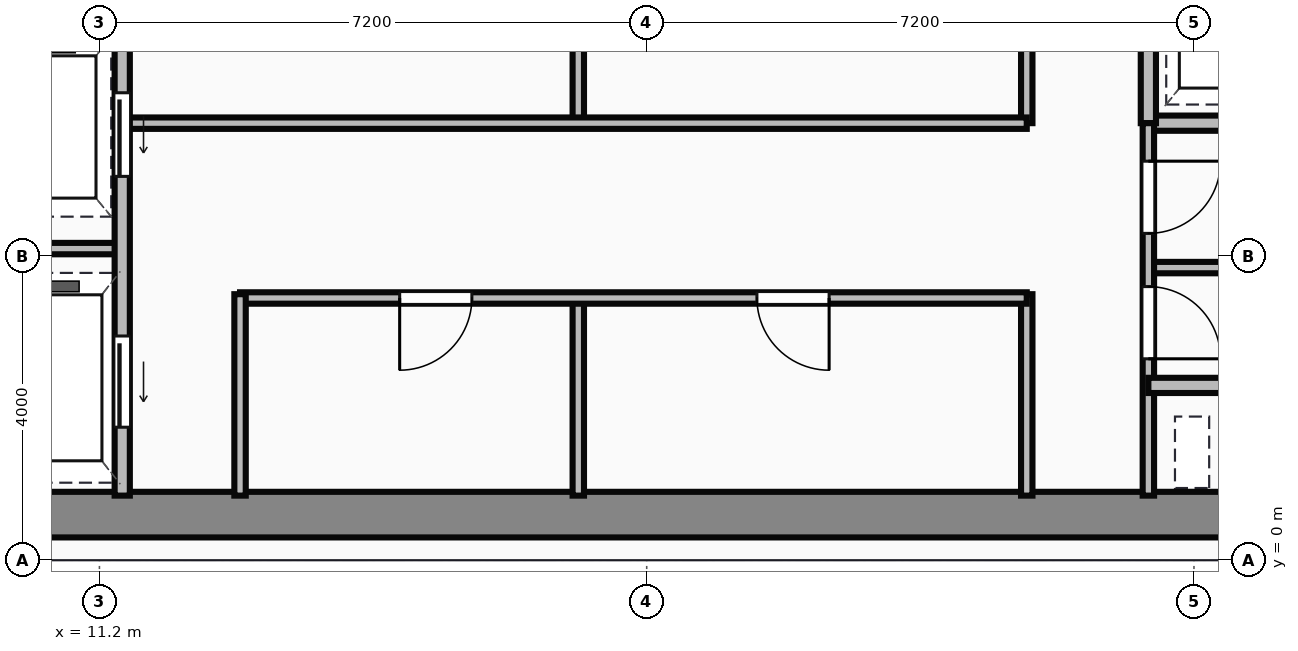
"""IFC4 building model, lengths in metres.
Left out: names, types, materials, properties, quantities, classifications, styles, units other than length and angle.
Written with IfcOpenShell. Run it as: python <this file> out.ifc"""

import sys

from ifc_helpers import new_model, si_unit, direction, frame, frame_2d, origin, place, context, subcontext, project, spatial, rectangle, extrude, source, transform, mapped, element, fill, save


model = new_model("IFC4")
c1 = context("Model", 3, precision=1e-05, world=origin(), true_north=direction((0.0, 1.0)))
c2 = subcontext(c1, "Body", "Model", "MODEL_VIEW")
j1 = project(units=[si_unit("LENGTHUNIT", "METRE"), si_unit("PLANEANGLEUNIT", "RADIAN")], contexts=[c1])
p1 = place(None, origin())
s1 = spatial("IfcSite", under=j1, at=p1, CompositionType="ELEMENT")
p2 = place(p1, origin())
s2 = spatial("IfcBuilding", under=s1, at=p2, CompositionType="ELEMENT")
p3 = place(p2, frame((0.0, 0.0, 217.8)))
s3 = spatial("IfcBuildingStorey", under=s2, at=p3, CompositionType="ELEMENT", Elevation=217.8)
m1 = source(origin(), c2, "Body", "SweptSolid", [
    extrude(rectangle(XDim=29.5, YDim=0.6, at=frame_2d((14.75, 0.0))), origin(), (0.0, 0.0, 1.0), 3.65),
])
p4 = place(p3, frame((4.5, 0.6, 0.0), z_axis=(0.0, 0.0, 1.0), x_axis=(1.0, 0.0, 0.0)))
e1 = element("IfcWall", 1, at=p4, inside=s3, PredefinedType="SHEAR", context=c2, shape_type="MappedRepresentation", body=[
    mapped(m1, transform((0.0, 0.0, 0.0))),
])
m2 = source(origin(), c2, "Body", "SweptSolid", [
    extrude(rectangle(XDim=9.6, YDim=0.2, at=frame_2d((4.8, 0.0))), origin(), (0.0, 0.0, 1.0), 3.4),
])
p5 = place(p3, frame((11.5, 0.85, 0.0), z_axis=(0.0, 0.0, 1.0), x_axis=(0.0, 1.0, 0.0)))
e2 = element("IfcWall", 2, at=p5, inside=s3, PredefinedType="PARTITIONING", context=c2, shape_type="MappedRepresentation", body=[
    mapped(m2, transform((0.0, 0.0, 0.0))),
])
p6 = place(p5, frame((4.2, 0.0, 0.0)))
e3 = element("IfcOpeningElement", 3, at=p6, cuts=e2, PredefinedType="OPENING", context=c2, shape_type="SweptSolid", body=[
    extrude(rectangle(XDim=1.1, YDim=2.15, at=frame_2d((0.55, 1.075))), frame((0.0, 0.11, 0.0), z_axis=(0.0, -1.0, 0.0), x_axis=(1.0, 0.0, 0.0)), (0.0, 0.0, 1.0), 0.22),
])
p7 = place(p5, frame((0.9, 0.0, 0.0)))
e4 = element("IfcOpeningElement", 4, at=p7, cuts=e2, PredefinedType="OPENING", context=c2, shape_type="SweptSolid", body=[
    extrude(rectangle(XDim=1.2, YDim=2.15, at=frame_2d((0.6, 1.075))), frame((0.0, 0.11, 0.0), z_axis=(0.0, -1.0, 0.0), x_axis=(1.0, 0.0, 0.0)), (0.0, 0.0, 1.0), 0.22),
])
m3 = source(origin(), c2, "Body", "SweptSolid", [
    extrude(rectangle(XDim=2.4, YDim=0.15, at=frame_2d((1.2, 0.0))), origin(), (0.0, 0.0, 1.0), 3.4),
])
p8 = place(p3, frame((9.1, 4.1, 0.0), z_axis=(0.0, 0.0, 1.0), x_axis=(1.0, 0.0, 0.0)))
e5 = element("IfcWall", 5, at=p8, inside=s3, PredefinedType="PARTITIONING", context=c2, shape_type="MappedRepresentation", body=[
    mapped(m3, transform((0.0, 0.0, 0.0))),
])
m4 = source(origin(), c2, "Body", "SweptSolid", [
    extrude(rectangle(XDim=2.65, YDim=0.15, at=frame_2d((1.325, 0.0))), origin(), (0.0, 0.0, 1.0), 3.4),
])
p9 = place(p3, frame((13.05, 0.85, 0.0), z_axis=(0.0, 0.0, 1.0), x_axis=(0.0, 1.0, 0.0)))
e6 = element("IfcWall", 6, at=p9, inside=s3, PredefinedType="PARTITIONING", context=c2, shape_type="MappedRepresentation", body=[
    mapped(m4, transform((0.0, 0.0, 0.0))),
])
m5 = source(origin(), c2, "Body", "SweptSolid", [
    extrude(rectangle(XDim=10.35, YDim=0.15, at=frame_2d((5.175, 0.0))), origin(), (0.0, 0.0, 1.0), 3.4),
])
p10 = place(p3, frame((13.05, 3.45, 0.0), z_axis=(0.0, 0.0, 1.0), x_axis=(1.0, 0.0, 0.0)))
e7 = element("IfcWall", 7, at=p10, inside=s3, PredefinedType="PARTITIONING", context=c2, shape_type="MappedRepresentation", body=[
    mapped(m5, transform((0.0, 0.0, 0.0))),
])
p11 = place(p10, frame((2.1, 0.0, 0.0)))
e8 = element("IfcOpeningElement", 8, at=p11, cuts=e7, PredefinedType="OPENING", context=c2, shape_type="SweptSolid", body=[
    extrude(rectangle(XDim=0.95, YDim=2.15, at=frame_2d((0.475, 1.075))), frame((0.0, 0.085, 0.0), z_axis=(0.0, -1.0, 0.0), x_axis=(1.0, 0.0, 0.0)), (0.0, 0.0, 1.0), 0.17),
])
p12 = place(p10, frame((6.8, 0.0, 0.0)))
e9 = element("IfcOpeningElement", 9, at=p12, cuts=e7, PredefinedType="OPENING", context=c2, shape_type="SweptSolid", body=[
    extrude(rectangle(XDim=0.95, YDim=2.15, at=frame_2d((0.475, 1.075))), frame((0.0, 0.085, 0.0), z_axis=(0.0, -1.0, 0.0), x_axis=(1.0, 0.0, 0.0)), (0.0, 0.0, 1.0), 0.17),
])
p13 = place(p3, frame((23.4, 0.85, 0.0), z_axis=(0.0, 0.0, 1.0), x_axis=(0.0, 1.0, 0.0)))
e10 = element("IfcWall", 10, at=p13, inside=s3, PredefinedType="PARTITIONING", context=c2, shape_type="MappedRepresentation", body=[
    mapped(m4, transform((0.0, 0.0, 0.0))),
])
m6 = source(origin(), c2, "Body", "SweptSolid", [
    extrude(rectangle(XDim=2.6, YDim=0.15, at=frame_2d((1.3, 0.0))), origin(), (0.0, 0.0, 1.0), 3.4),
])
p14 = place(p3, frame((17.5, 0.85, 0.0), z_axis=(0.0, 0.0, 1.0), x_axis=(0.0, 1.0, 0.0)))
e11 = element("IfcWall", 11, at=p14, inside=s3, PredefinedType="PARTITIONING", context=c2, shape_type="MappedRepresentation", body=[
    mapped(m6, transform((0.0, 0.0, 0.0))),
])
m7 = source(origin(), c2, "Body", "SweptSolid", [
    extrude(rectangle(XDim=11.85, YDim=0.15, at=frame_2d((5.925, 0.0))), origin(), (0.0, 0.0, 1.0), 3.4),
])
p15 = place(p3, frame((11.55, 5.75, 0.0), z_axis=(0.0, 0.0, 1.0), x_axis=(1.0, 0.0, 0.0)))
e12 = element("IfcWall", 12, at=p15, inside=s3, PredefinedType="PARTITIONING", context=c2, shape_type="MappedRepresentation", body=[
    mapped(m7, transform((0.0, 0.0, 0.0))),
])
m8 = source(origin(), c2, "Body", "SweptSolid", [
    extrude(rectangle(XDim=2.6, YDim=0.15, at=frame_2d((1.3, 0.0))), origin(), (0.0, 0.0, 1.0), 3.4),
])
p16 = place(p3, frame((23.4, 5.75, 0.0), z_axis=(0.0, 0.0, 1.0), x_axis=(0.0, 1.0, 0.0)))
e13 = element("IfcWall", 13, at=p16, inside=s3, PredefinedType="PARTITIONING", context=c2, shape_type="MappedRepresentation", body=[
    mapped(m8, transform((0.0, 0.0, 0.0))),
])
m9 = source(origin(), c2, "Body", "SweptSolid", [
    extrude(rectangle(XDim=2.5, YDim=0.15, at=frame_2d((1.25, 0.0))), origin(), (0.0, 0.0, 1.0), 3.4),
])
p17 = place(p3, frame((17.5, 5.8, 0.0), z_axis=(0.0, 0.0, 1.0), x_axis=(0.0, 1.0, 0.0)))
e14 = element("IfcWall", 14, at=p17, inside=s3, PredefinedType="PARTITIONING", context=c2, shape_type="MappedRepresentation", body=[
    mapped(m9, transform((0.0, 0.0, 0.0))),
])
m10 = source(origin(), c2, "Body", "SweptSolid", [
    extrude(rectangle(XDim=4.55, YDim=0.2, at=frame_2d((2.275, 0.0))), origin(), (0.0, 0.0, 1.0), 3.4),
])
p18 = place(p3, frame((25.0, 5.75, 0.0), z_axis=(0.0, 0.0, 1.0), x_axis=(1.0, 0.0, 0.0)))
e15 = element("IfcWall", 15, at=p18, inside=s3, PredefinedType="PARTITIONING", context=c2, shape_type="MappedRepresentation", body=[
    mapped(m10, transform((0.0, 0.0, 0.0))),
])
m11 = source(origin(), c2, "Body", "SweptSolid", [
    extrude(rectangle(XDim=2.6, YDim=0.2, at=frame_2d((1.3, 0.0))), origin(), (0.0, 0.0, 1.0), 3.4),
])
p19 = place(p3, frame((25.0, 5.75, 0.0), z_axis=(0.0, 0.0, 1.0), x_axis=(0.0, 1.0, 0.0)))
e16 = element("IfcWall", 16, at=p19, inside=s3, PredefinedType="PARTITIONING", context=c2, shape_type="MappedRepresentation", body=[
    mapped(m11, transform((0.0, 0.0, 0.0))),
])
m12 = source(origin(), c2, "Body", "SweptSolid", [
    extrude(rectangle(XDim=4.9, YDim=0.15, at=frame_2d((2.45, 0.0))), origin(), (0.0, 0.0, 1.0), 3.4),
])
p20 = place(p3, frame((25.0, 0.85, 0.0), z_axis=(0.0, 0.0, 1.0), x_axis=(0.0, 1.0, 0.0)))
e17 = element("IfcWall", 17, at=p20, inside=s3, PredefinedType="PARTITIONING", context=c2, shape_type="MappedRepresentation", body=[
    mapped(m12, transform((0.0, 0.0, 0.0))),
])
p21 = place(p20, frame((1.8, 0.0, 0.0)))
e18 = element("IfcOpeningElement", 18, at=p21, cuts=e17, PredefinedType="OPENING", context=c2, shape_type="SweptSolid", body=[
    extrude(rectangle(XDim=0.95, YDim=2.15, at=frame_2d((0.475, 1.075))), frame((0.0, 0.085, 0.0), z_axis=(0.0, -1.0, 0.0), x_axis=(1.0, 0.0, 0.0)), (0.0, 0.0, 1.0), 0.17),
])
p22 = place(p20, frame((3.45, 0.0, 0.0)))
e19 = element("IfcOpeningElement", 19, at=p22, cuts=e17, PredefinedType="OPENING", context=c2, shape_type="SweptSolid", body=[
    extrude(rectangle(XDim=0.95, YDim=2.15, at=frame_2d((0.475, 1.075))), frame((0.0, 0.085, 0.0), z_axis=(0.0, -1.0, 0.0), x_axis=(1.0, 0.0, 0.0)), (0.0, 0.0, 1.0), 0.17),
])
m13 = source(origin(), c2, "Body", "SweptSolid", [
    extrude(rectangle(XDim=2.4, YDim=0.2, at=frame_2d((1.2, 0.0))), origin(), (0.0, 0.0, 1.0), 3.4),
])
p23 = place(p3, frame((25.0, 2.3, 0.0), z_axis=(0.0, 0.0, 1.0), x_axis=(1.0, 0.0, 0.0)))
e20 = element("IfcWall", 20, at=p23, inside=s3, PredefinedType="PARTITIONING", context=c2, shape_type="MappedRepresentation", body=[
    mapped(m13, transform((0.0, 0.0, 0.0))),
])
m14 = source(origin(), c2, "Body", "SweptSolid", [
    extrude(rectangle(XDim=4.55, YDim=0.15, at=frame_2d((2.275, 0.0))), origin(), (0.0, 0.0, 1.0), 3.4),
])
p24 = place(p3, frame((25.0, 3.85, 0.0), z_axis=(0.0, 0.0, 1.0), x_axis=(1.0, 0.0, 0.0)))
e21 = element("IfcWall", 21, at=p24, inside=s3, PredefinedType="PARTITIONING", context=c2, shape_type="MappedRepresentation", body=[
    mapped(m14, transform((0.0, 0.0, 0.0))),
])
m15 = source(origin(), c2, "Body", "SweptSolid", [
    extrude(rectangle(XDim=1.1, YDim=2.15, at=frame_2d((0.55, 1.075))), frame((0.0, 0.025, 0.0), z_axis=(0.0, -1.0, 0.0), x_axis=(1.0, 0.0, 0.0)), (0.0, 0.0, 1.0), 0.05),
])
p25 = place(p6, frame((1.1, 0.0, 0.0), z_axis=(0.0, 0.0, 1.0), x_axis=(-1.0, 0.0, 0.0)))
e22 = element("IfcDoor", 22, at=p25, inside=s3, OperationType="SLIDING_TO_LEFT", PredefinedType="DOOR", context=c2, shape_type="MappedRepresentation", body=[
    mapped(m15, transform((0.0, 0.0, 0.0))),
])
fill(e3, e22)
m16 = source(origin(), c2, "Body", "SweptSolid", [
    extrude(rectangle(XDim=1.2, YDim=2.15, at=frame_2d((0.6, 1.075))), frame((0.0, 0.025, 0.0), z_axis=(0.0, -1.0, 0.0), x_axis=(1.0, 0.0, 0.0)), (0.0, 0.0, 1.0), 0.05),
])
p26 = place(p7, frame((1.2, 0.0, 0.0), z_axis=(0.0, 0.0, 1.0), x_axis=(-1.0, 0.0, 0.0)))
e23 = element("IfcDoor", 23, at=p26, inside=s3, OperationType="SLIDING_TO_LEFT", PredefinedType="DOOR", context=c2, shape_type="MappedRepresentation", body=[
    mapped(m16, transform((0.0, 0.0, 0.0))),
])
fill(e4, e23)
m17 = source(origin(), c2, "Body", "SweptSolid", [
    extrude(rectangle(XDim=0.95, YDim=2.15, at=frame_2d((0.475, 1.075))), frame((0.0, 0.025, 0.0), z_axis=(0.0, -1.0, 0.0), x_axis=(1.0, 0.0, 0.0)), (0.0, 0.0, 1.0), 0.05),
])
p27 = place(p11, origin())
e24 = element("IfcDoor", 24, at=p27, inside=s3, OperationType="SINGLE_SWING_LEFT", PredefinedType="DOOR", context=c2, shape_type="MappedRepresentation", body=[
    mapped(m17, transform((0.0, 0.0, 0.0))),
])
fill(e8, e24)
p28 = place(p12, origin())
e25 = element("IfcDoor", 25, at=p28, inside=s3, OperationType="SINGLE_SWING_RIGHT", PredefinedType="DOOR", context=c2, shape_type="MappedRepresentation", body=[
    mapped(m17, transform((0.0, 0.0, 0.0))),
])
fill(e9, e25)
p29 = place(p21, origin())
e26 = element("IfcDoor", 26, at=p29, inside=s3, OperationType="SINGLE_SWING_LEFT", PredefinedType="DOOR", context=c2, shape_type="MappedRepresentation", body=[
    mapped(m17, transform((0.0, 0.0, 0.0))),
])
fill(e18, e26)
p30 = place(p22, origin())
e27 = element("IfcDoor", 27, at=p30, inside=s3, OperationType="SINGLE_SWING_RIGHT", PredefinedType="DOOR", context=c2, shape_type="MappedRepresentation", body=[
    mapped(m17, transform((0.0, 0.0, 0.0))),
])
fill(e19, e27)
save(model, sys.argv[1])
